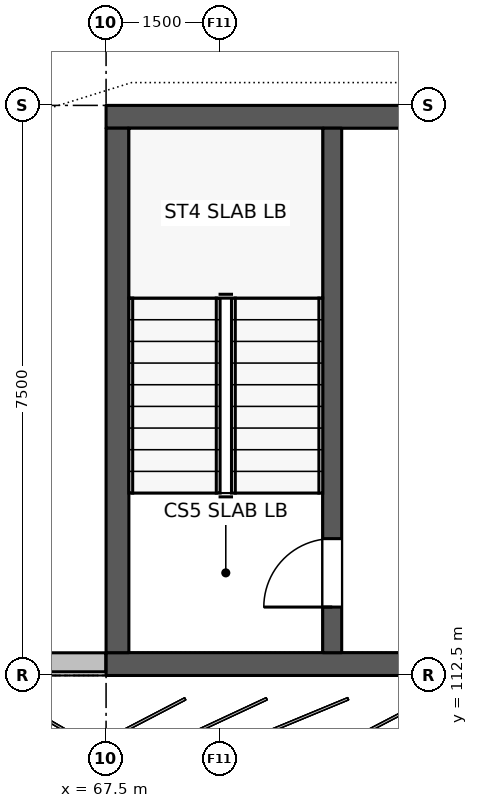
"""IFC4 building model, lengths in metres.
Left out: names, types, materials, properties, quantities, classifications, styles, units other than length and angle.
Written with IfcOpenShell. Run it as: python <this file> out.ifc"""

import sys

from ifc_helpers import new_model, si_unit, direction, frame, frame_2d, origin, place, context, subcontext, project, spatial, rectangle, extrude, element, fill, save


model = new_model("IFC4")
c1 = context("Model", 3, precision=1e-05, world=origin(), true_north=direction((0.0, 1.0)))
c2 = subcontext(c1, "Body", "Model", "MODEL_VIEW")
j1 = project(units=[si_unit("LENGTHUNIT", "METRE"), si_unit("PLANEANGLEUNIT", "RADIAN")], contexts=[c1])
p1 = place(None, origin())
s1 = spatial("IfcSite", under=j1, at=p1, CompositionType="ELEMENT")
p2 = place(p1, origin())
s2 = spatial("IfcBuilding", under=s1, at=p2, CompositionType="ELEMENT")
p3 = place(p2, frame((0.0, 0.0, 3.3)))
s3 = spatial("IfcBuildingStorey", under=s2, at=p3, CompositionType="ELEMENT", Elevation=3.3)
p4 = place(p3, frame((60.186, 112.673, 0.0), z_axis=(0.0, 0.0, 1.0), x_axis=(1.0, 0.0, 0.0)))
e1 = element("IfcWall", 1, at=p4, inside=s3, PredefinedType="SOLIDWALL", context=c2, shape_type="SweptSolid", body=[
    extrude(rectangle(XDim=7.31, YDim=0.25, at=frame_2d((3.655, 0.0))), origin(), (0.0, 0.0, 1.0), 1.1),
])
p5 = place(p3, frame((67.5, 119.85, 0.0), z_axis=(0.0, 0.0, 1.0), x_axis=(1.0, 0.0, 0.0)))
e2 = element("IfcWall", 2, at=p5, inside=s3, PredefinedType="SHEAR", context=c2, shape_type="SweptSolid", body=[
    extrude(rectangle(XDim=15.0, YDim=0.3, at=frame_2d((7.5, 0.0))), origin(), (0.0, 0.0, 1.0), 3.3),
])
p6 = place(p5, frame((6.6, 0.0, 0.0)))
e3 = element("IfcOpeningElement", 3, at=p6, cuts=e2, PredefinedType="OPENING", context=c2, shape_type="SweptSolid", body=[
    extrude(rectangle(XDim=1.8, YDim=2.1, at=frame_2d((0.9, 1.05))), frame((0.0, 0.16, 0.0), z_axis=(0.0, -1.0, 0.0), x_axis=(1.0, 0.0, 0.0)), (0.0, 0.0, 1.0), 0.32),
])
p7 = place(p3, frame((72.5, 112.65, 0.0), z_axis=(0.0, 0.0, 1.0), x_axis=(-1.0, 0.0, 0.0)))
e4 = element("IfcWall", 4, at=p7, inside=s3, PredefinedType="SHEAR", context=c2, shape_type="SweptSolid", body=[
    extrude(rectangle(XDim=5.0, YDim=0.3, at=frame_2d((2.5, 0.0))), origin(), (0.0, 0.0, 1.0), 3.3),
])
p8 = place(p3, frame((67.65, 119.7, 0.0), z_axis=(0.0, 0.0, 1.0), x_axis=(0.0, -1.0, 0.0)))
e5 = element("IfcWall", 5, at=p8, inside=s3, PredefinedType="SHEAR", context=c2, shape_type="SweptSolid", body=[
    extrude(rectangle(XDim=6.9, YDim=0.3, at=frame_2d((3.45, 0.0))), origin(), (0.0, 0.0, 1.0), 3.3),
])
p9 = place(p3, frame((70.475, 112.8, 0.0), z_axis=(0.0, 0.0, 1.0), x_axis=(0.0, 1.0, 0.0)))
e6 = element("IfcWall", 6, at=p9, inside=s3, PredefinedType="STANDARD", context=c2, shape_type="SweptSolid", body=[
    extrude(rectangle(XDim=6.9, YDim=0.25, at=frame_2d((3.45, 0.0))), origin(), (0.0, 0.0, 1.0), 3.1),
])
p10 = place(p9, frame((0.6, 0.0, 0.0)))
e7 = element("IfcOpeningElement", 7, at=p10, cuts=e6, PredefinedType="OPENING", context=c2, shape_type="SweptSolid", body=[
    extrude(rectangle(XDim=0.9, YDim=2.1, at=frame_2d((0.45, 1.05))), frame((0.0, 0.135, 0.0), z_axis=(0.0, -1.0, 0.0), x_axis=(1.0, 0.0, 0.0)), (0.0, 0.0, 1.0), 0.27),
])
p11 = place(p10, origin())
e8 = element("IfcDoor", 8, at=p11, inside=s3, OperationType="SINGLE_SWING_RIGHT", PredefinedType="DOOR", context=c2, shape_type="SweptSolid", body=[
    extrude(rectangle(XDim=0.9, YDim=2.1, at=frame_2d((0.45, 1.05))), frame((0.0, 0.025, 0.0), z_axis=(0.0, -1.0, 0.0), x_axis=(1.0, 0.0, 0.0)), (0.0, 0.0, 1.0), 0.05),
])
fill(e7, e8)
save(model, sys.argv[1])
